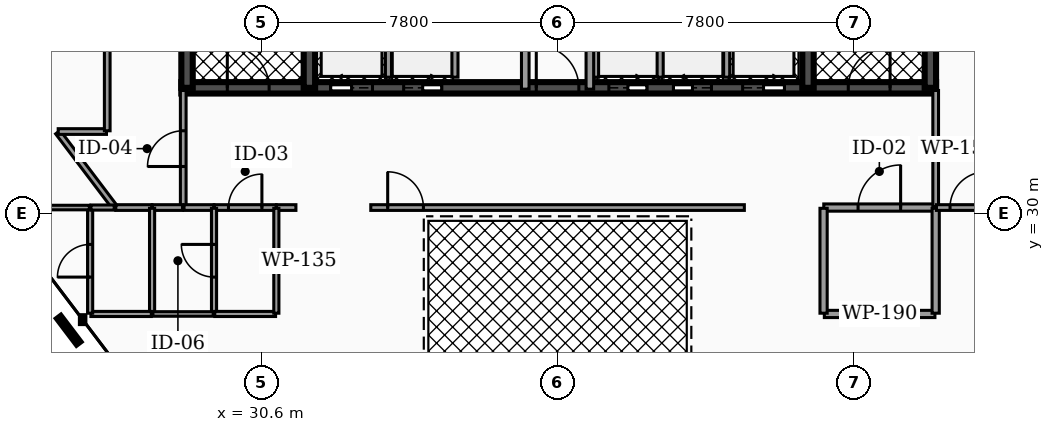
"""IFC4 building model, lengths in metres.
Left out: names, types, materials, properties, quantities, classifications, styles, units other than length and angle.
Written with IfcOpenShell. Run it as: python <this file> out.ifc"""

import sys

from ifc_helpers import new_model, si_unit, direction, frame, frame_2d, origin, place, context, subcontext, project, spatial, rectangle, extrude, element, fill, save


model = new_model("IFC4")
c1 = context("Model", 3, precision=1e-05, world=origin(), true_north=direction((0.0, 1.0)))
c2 = subcontext(c1, "Body", "Model", "MODEL_VIEW")
j1 = project(units=[si_unit("LENGTHUNIT", "METRE"), si_unit("PLANEANGLEUNIT", "RADIAN")], contexts=[c1])
p1 = place(None, origin())
s1 = spatial("IfcSite", under=j1, at=p1, CompositionType="ELEMENT")
p2 = place(p1, origin())
s2 = spatial("IfcBuilding", under=s1, at=p2, CompositionType="ELEMENT")
p3 = place(p2, frame((0.0, 0.0, 229.16)))
s3 = spatial("IfcBuildingStorey", under=s2, at=p3, CompositionType="ELEMENT", Elevation=229.16)
p4 = place(p3, frame((28.5, 33.3, 0.0), z_axis=(0.0, 0.0, 1.0), x_axis=(1.0, 0.0, 0.0)))
e1 = element("IfcWall", 1, at=p4, inside=s3, PredefinedType="SHEAR", context=c2, shape_type="SweptSolid", body=[
    extrude(rectangle(XDim=19.86, YDim=0.3, at=frame_2d((9.93, 0.0))), origin(), (0.0, 0.0, 1.0), 3.18),
])
p5 = place(p4, frame((3.93, 0.0, 0.0)))
e2 = element("IfcOpeningElement", 2, at=p5, cuts=e1, PredefinedType="OPENING", context=c2, shape_type="SweptSolid", body=[
    extrude(rectangle(XDim=1.1, YDim=2.15, at=frame_2d((0.55, 1.075))), frame((0.0, 0.16, 0.0), z_axis=(0.0, -1.0, 0.0), x_axis=(1.0, 0.0, 0.0)), (0.0, 0.0, 1.0), 0.32),
])
p6 = place(p4, frame((14.77, 0.0, 0.0)))
e3 = element("IfcOpeningElement", 3, at=p6, cuts=e1, PredefinedType="OPENING", context=c2, shape_type="SweptSolid", body=[
    extrude(rectangle(XDim=1.1, YDim=2.15, at=frame_2d((0.55, 1.075))), frame((0.0, 0.16, 0.0), z_axis=(0.0, -1.0, 0.0), x_axis=(1.0, 0.0, 0.0)), (0.0, 0.0, 1.0), 0.32),
])
p7 = place(p4, frame((11.25, 0.0, 0.0)))
e4 = element("IfcOpeningElement", 4, at=p7, cuts=e1, PredefinedType="OPENING", context=c2, shape_type="SweptSolid", body=[
    extrude(rectangle(XDim=1.0, YDim=2.1, at=frame_2d((0.5, 1.05))), frame((0.0, 0.16, 0.0), z_axis=(0.0, -1.0, 0.0), x_axis=(1.0, 0.0, 0.0)), (0.0, 0.0, 1.0), 0.32),
])
p8 = place(p4, frame((12.95, 0.0, 0.0)))
e5 = element("IfcOpeningElement", 5, at=p8, cuts=e1, PredefinedType="OPENING", context=c2, shape_type="SweptSolid", body=[
    extrude(rectangle(XDim=1.0, YDim=2.1, at=frame_2d((0.5, 1.05))), frame((0.0, 0.16, 0.0), z_axis=(0.0, -1.0, 0.0), x_axis=(1.0, 0.0, 0.0)), (0.0, 0.0, 1.0), 0.32),
])
p9 = place(p4, frame((5.85, 0.0, 0.0)))
e6 = element("IfcOpeningElement", 6, at=p9, cuts=e1, PredefinedType="OPENING", context=c2, shape_type="SweptSolid", body=[
    extrude(rectangle(XDim=1.0, YDim=2.1, at=frame_2d((0.5, 1.05))), frame((0.0, 0.16, 0.0), z_axis=(0.0, -1.0, 0.0), x_axis=(1.0, 0.0, 0.0)), (0.0, 0.0, 1.0), 0.32),
])
p10 = place(p4, frame((1.21, 0.0, 0.0)))
e7 = element("IfcOpeningElement", 7, at=p10, cuts=e1, PredefinedType="OPENING", context=c2, shape_type="SweptSolid", body=[
    extrude(rectangle(XDim=1.1, YDim=2.2, at=frame_2d((0.55, 1.1))), frame((0.0, 0.16, 0.0), z_axis=(0.0, -1.0, 0.0), x_axis=(1.0, 0.0, 0.0)), (0.0, 0.0, 1.0), 0.32),
])
p11 = place(p4, frame((9.34, 0.0, 0.0)))
e8 = element("IfcOpeningElement", 8, at=p11, cuts=e1, PredefinedType="OPENING", context=c2, shape_type="SweptSolid", body=[
    extrude(rectangle(XDim=1.12, YDim=2.05, at=frame_2d((0.56, 1.025))), frame((0.0, 0.16, 0.0), z_axis=(0.0, -1.0, 0.0), x_axis=(1.0, 0.0, 0.0)), (0.0, 0.0, 1.0), 0.32),
])
p12 = place(p4, frame((17.55, 0.0, 0.0)))
e9 = element("IfcOpeningElement", 9, at=p12, cuts=e1, PredefinedType="OPENING", context=c2, shape_type="SweptSolid", body=[
    extrude(rectangle(XDim=1.1, YDim=2.2, at=frame_2d((0.55, 1.1))), frame((0.0, 0.16, 0.0), z_axis=(0.0, -1.0, 0.0), x_axis=(1.0, 0.0, 0.0)), (0.0, 0.0, 1.0), 0.32),
])
for number, where, z_axis, x_axis in (
    (10, (28.65, 33.3, 0.0), (0.0, 0.0, 1.0), (0.0, 1.0, 0.0)),
    (11, (31.87, 33.3, 0.0), (0.0, 0.0, 1.0), (0.0, 1.0, 0.0)),
    (12, (44.99, 33.3, 0.0), (0.0, 0.0, 1.0), (0.0, 1.0, 0.0)),
    (13, (48.21, 33.3, 0.0), (0.0, 0.0, 1.0), (0.0, 1.0, 0.0)),
):
    element("IfcWall", number, at=place(p3, frame(where, z_axis=z_axis, x_axis=x_axis)), inside=s3, PredefinedType="SHEAR", context=c2, shape_type="SweptSolid", body=[
        extrude(rectangle(XDim=10.1, YDim=0.3, at=frame_2d((5.05, 0.0))), origin(), (0.0, 0.0, 1.0), 3.18),
    ])
for number, where, z_axis, x_axis in (
    (14, (33.95, 33.58, 0.0), (0.0, 0.0, 1.0), (0.0, 1.0, 0.0)),
    (15, (42.85, 33.58, 0.0), (0.0, 0.0, 1.0), (0.0, 1.0, 0.0)),
):
    element("IfcWall", number, at=place(p3, frame(where, z_axis=z_axis, x_axis=x_axis)), inside=s3, PredefinedType="SOLIDWALL", context=c2, shape_type="SweptSolid", body=[
        extrude(rectangle(XDim=2.45, YDim=0.16, at=frame_2d((1.225, 0.0))), origin(), (0.0, 0.0, 1.0), 3.18),
    ])
for number, where, z_axis, x_axis in (
    (16, (39.4, 33.58, 0.0), (0.0, 0.0, 1.0), (0.0, 1.0, 0.0)),
    (17, (41.1, 33.58, 0.0), (0.0, 0.0, 1.0), (0.0, 1.0, 0.0)),
    (18, (35.7, 33.58, 0.0), (0.0, 0.0, 1.0), (0.0, 1.0, 0.0)),
):
    element("IfcWall", number, at=place(p3, frame(where, z_axis=z_axis, x_axis=x_axis)), inside=s3, PredefinedType="SOLIDWALL", context=c2, shape_type="SweptSolid", body=[
        extrude(rectangle(XDim=2.25, YDim=0.16, at=frame_2d((1.125, 0.0))), origin(), (0.0, 0.0, 1.0), 3.18),
    ])
p13 = place(p3, frame((37.55, 33.265, 0.0), z_axis=(0.0, 0.0, 1.0), x_axis=(0.0, 1.0, 0.0)))
e19 = element("IfcWall", 19, at=p13, inside=s3, PredefinedType="PARTITIONING", context=c2, shape_type="SweptSolid", body=[
    extrude(rectangle(XDim=4.595, YDim=0.2, at=frame_2d((2.298, 0.0))), origin(), (0.0, 0.0, 1.0), 2.235),
])
p14 = place(p13, frame((1.857, 0.0, 0.0)))
e20 = element("IfcOpeningElement", 20, at=p14, cuts=e19, PredefinedType="OPENING", context=c2, shape_type="SweptSolid", body=[
    extrude(rectangle(XDim=0.88, YDim=2.05, at=frame_2d((0.44, 1.025))), frame((0.0, 0.11, 0.0), z_axis=(0.0, -1.0, 0.0), x_axis=(1.0, 0.0, 0.0)), (0.0, 0.0, 1.0), 0.22),
])
p15 = place(p3, frame((39.25, 33.265, 0.0), z_axis=(0.0, 0.0, 1.0), x_axis=(0.0, 1.0, 0.0)))
e21 = element("IfcWall", 21, at=p15, inside=s3, PredefinedType="PARTITIONING", context=c2, shape_type="SweptSolid", body=[
    extrude(rectangle(XDim=4.595, YDim=0.2, at=frame_2d((2.298, 0.0))), origin(), (0.0, 0.0, 1.0), 2.235),
])
p16 = place(p15, frame((3.058, 0.0, 0.0)))
e22 = element("IfcOpeningElement", 22, at=p16, cuts=e21, PredefinedType="OPENING", context=c2, shape_type="SweptSolid", body=[
    extrude(rectangle(XDim=0.88, YDim=2.05, at=frame_2d((0.44, 1.025))), frame((0.0, 0.11, 0.0), z_axis=(0.0, -1.0, 0.0), x_axis=(1.0, 0.0, 0.0)), (0.0, 0.0, 1.0), 0.22),
])
p17 = place(p3, frame((45.405, 30.15, 0.0), z_axis=(0.0, 0.0, 1.0), x_axis=(1.0, 0.0, 0.0)))
e23 = element("IfcWall", 23, at=p17, inside=s3, PredefinedType="PARTITIONING", context=c2, shape_type="SweptSolid", body=[
    extrude(rectangle(XDim=2.925, YDim=0.19, at=frame_2d((1.462, 0.0))), origin(), (0.0, 0.0, 1.0), 2.235),
])
p18 = place(p17, frame((0.903, 0.0, 0.0)))
e24 = element("IfcOpeningElement", 24, at=p18, cuts=e23, PredefinedType="OPENING", context=c2, shape_type="SweptSolid", body=[
    extrude(rectangle(XDim=1.12, YDim=2.05, at=frame_2d((0.56, 1.025))), frame((0.0, 0.105, 0.0), z_axis=(0.0, -1.0, 0.0), x_axis=(1.0, 0.0, 0.0)), (0.0, 0.0, 1.0), 0.21),
])
p19 = place(p3, frame((28.55, 30.17, 0.0), z_axis=(0.0, 0.0, 1.0), x_axis=(0.0, 1.0, 0.0)))
e25 = element("IfcWall", 25, at=p19, inside=s3, PredefinedType="PARTITIONING", context=c2, shape_type="SweptSolid", body=[
    extrude(rectangle(XDim=3.06, YDim=0.15, at=frame_2d((1.53, 0.0))), origin(), (0.0, 0.0, 1.0), 2.235),
])
p20 = place(p19, frame((1.06, 0.0, 0.0)))
e26 = element("IfcOpeningElement", 26, at=p20, cuts=e25, PredefinedType="OPENING", context=c2, shape_type="SweptSolid", body=[
    extrude(rectangle(XDim=0.94, YDim=2.05, at=frame_2d((0.47, 1.025))), frame((0.0, 0.085, 0.0), z_axis=(0.0, -1.0, 0.0), x_axis=(1.0, 0.0, 0.0)), (0.0, 0.0, 1.0), 0.17),
])
p21 = place(p3, frame((48.35, 30.17, 0.0), z_axis=(0.0, 0.0, 1.0), x_axis=(0.0, 1.0, 0.0)))
e27 = element("IfcWall", 27, at=p21, inside=s3, PredefinedType="PARTITIONING", context=c2, shape_type="SweptSolid", body=[
    extrude(rectangle(XDim=3.06, YDim=0.15, at=frame_2d((1.53, 0.0))), origin(), (0.0, 0.0, 1.0), 2.235),
])
p22 = place(p3, frame((29.365, 30.15, 0.0), z_axis=(0.0, 0.0, 1.0), x_axis=(1.0, 0.0, 0.0)))
e28 = element("IfcWall", 28, at=p22, inside=s3, PredefinedType="PARTITIONING", context=c2, shape_type="SweptSolid", body=[
    extrude(rectangle(XDim=1.63, YDim=0.15, at=frame_2d((0.815, 0.0))), origin(), (0.0, 0.0, 1.0), 2.235),
])
p23 = place(p22, frame((0.375, 0.0, 0.0)))
e29 = element("IfcOpeningElement", 29, at=p23, cuts=e28, PredefinedType="OPENING", context=c2, shape_type="SweptSolid", body=[
    extrude(rectangle(XDim=0.88, YDim=2.05, at=frame_2d((0.44, 1.025))), frame((0.0, 0.085, 0.0), z_axis=(0.0, -1.0, 0.0), x_axis=(1.0, 0.0, 0.0)), (0.0, 0.0, 1.0), 0.17),
])
p24 = place(p3, frame((28.57, 30.15, 0.0), z_axis=(0.0, 0.0, 1.0), x_axis=(1.0, 0.0, 0.0)))
e30 = element("IfcWall", 30, at=p24, inside=s3, PredefinedType="PARTITIONING", context=c2, shape_type="SweptSolid", body=[
    extrude(rectangle(XDim=0.785, YDim=0.15, at=frame_2d((0.393, 0.0))), origin(), (0.0, 0.0, 1.0), 2.235),
])
p25 = place(p3, frame((33.485, 30.15, 0.0), z_axis=(0.0, 0.0, 1.0), x_axis=(1.0, 0.0, 0.0)))
e31 = element("IfcWall", 31, at=p25, inside=s3, PredefinedType="PARTITIONING", context=c2, shape_type="SweptSolid", body=[
    extrude(rectangle(XDim=9.83, YDim=0.15, at=frame_2d((4.915, 0.0))), origin(), (0.0, 0.0, 1.0), 2.235),
])
p26 = place(p25, frame((0.445, 0.0, 0.0)))
e32 = element("IfcOpeningElement", 32, at=p26, cuts=e31, PredefinedType="OPENING", context=c2, shape_type="SweptSolid", body=[
    extrude(rectangle(XDim=0.94, YDim=2.05, at=frame_2d((0.47, 1.025))), frame((0.0, 0.085, 0.0), z_axis=(0.0, -1.0, 0.0), x_axis=(1.0, 0.0, 0.0)), (0.0, 0.0, 1.0), 0.17),
])
p27 = place(p3, frame((31.005, 30.15, 0.0), z_axis=(0.0, 0.0, 1.0), x_axis=(1.0, 0.0, 0.0)))
e33 = element("IfcWall", 33, at=p27, inside=s3, PredefinedType="PARTITIONING", context=c2, shape_type="SweptSolid", body=[
    extrude(rectangle(XDim=0.51, YDim=0.15, at=frame_2d((0.255, 0.0))), origin(), (0.0, 0.0, 1.0), 2.235),
])
p28 = place(p3, frame((45.42, 27.35, 0.0), z_axis=(0.0, 0.0, 1.0), x_axis=(1.0, 0.0, 0.0)))
e34 = element("IfcWall", 34, at=p28, inside=s3, PredefinedType="PARTITIONING", context=c2, shape_type="SweptSolid", body=[
    extrude(rectangle(XDim=2.91, YDim=0.19, at=frame_2d((1.455, 0.0))), origin(), (0.0, 0.0, 1.0), 2.235),
])
for number, where, z_axis, x_axis in (
    (35, (45.4, 27.37, 0.0), (0.0, 0.0, 1.0), (0.0, 1.0, 0.0)),
    (36, (48.35, 27.37, 0.0), (0.0, 0.0, 1.0), (0.0, 1.0, 0.0)),
):
    element("IfcWall", number, at=place(p3, frame(where, z_axis=z_axis, x_axis=x_axis)), inside=s3, PredefinedType="PARTITIONING", context=c2, shape_type="SweptSolid", body=[
        extrude(rectangle(XDim=2.76, YDim=0.19, at=frame_2d((1.38, 0.0))), origin(), (0.0, 0.0, 1.0), 2.235),
    ])
p29 = place(p3, frame((26.775, 30.15, 0.0), z_axis=(0.0, 0.0, 1.0), x_axis=(1.0, 0.0, 0.0)))
e37 = element("IfcWall", 37, at=p29, inside=s3, PredefinedType="PARTITIONING", context=c2, shape_type="SweptSolid", body=[
    extrude(rectangle(XDim=0.95, YDim=0.15, at=frame_2d((0.475, 0.0))), origin(), (0.0, 0.0, 1.0), 2.235),
])
p30 = place(p3, frame((27.735, 30.15, 0.0), z_axis=(0.0, 0.0, 1.0), x_axis=(1.0, 0.0, 0.0)))
e38 = element("IfcWall", 38, at=p30, inside=s3, PredefinedType="PARTITIONING", context=c2, shape_type="SweptSolid", body=[
    extrude(rectangle(XDim=0.795, YDim=0.15, at=frame_2d((0.397, 0.0))), origin(), (0.0, 0.0, 1.0), 2.235),
])
p31 = place(p3, frame((48.37, 30.15, 0.0), z_axis=(0.0, 0.0, 1.0), x_axis=(1.0, 0.0, 0.0)))
e39 = element("IfcWall", 39, at=p31, inside=s3, PredefinedType="PARTITIONING", context=c2, shape_type="SweptSolid", body=[
    extrude(rectangle(XDim=1.655, YDim=0.15, at=frame_2d((0.828, 0.0))), origin(), (0.0, 0.0, 1.0), 2.235),
])
p32 = place(p31, frame((0.358, 0.0, 0.0)))
e40 = element("IfcOpeningElement", 40, at=p32, cuts=e39, PredefinedType="OPENING", context=c2, shape_type="SweptSolid", body=[
    extrude(rectangle(XDim=0.94, YDim=2.05, at=frame_2d((0.47, 1.025))), frame((0.0, 0.085, 0.0), z_axis=(0.0, -1.0, 0.0), x_axis=(1.0, 0.0, 0.0)), (0.0, 0.0, 1.0), 0.17),
])
p33 = place(p3, frame((25.252, 32.134, 0.0), z_axis=(0.0, 0.0, 1.0), x_axis=(0.603869110647, -0.797083494502, 0.0)))
e41 = element("IfcWall", 41, at=p33, inside=s3, PredefinedType="PARTITIONING", context=c2, shape_type="SweptSolid", body=[
    extrude(rectangle(XDim=2.469, YDim=0.15, at=frame_2d((1.234, 0.0))), origin(), (0.0, 0.0, 1.0), 2.235),
])
p34 = place(p3, frame((25.26, 32.15, 0.0), z_axis=(0.0, 0.0, 1.0), x_axis=(1.0, 0.0, 0.0)))
e42 = element("IfcWall", 42, at=p34, inside=s3, PredefinedType="PARTITIONING", context=c2, shape_type="SweptSolid", body=[
    extrude(rectangle(XDim=1.271, YDim=0.15, at=frame_2d((0.635, 0.0))), origin(), (0.0, 0.0, 1.0), 2.235),
])
p35 = place(p3, frame((26.55, 32.17, 0.0), z_axis=(0.0, 0.0, 1.0), x_axis=(0.0, 1.0, 0.0)))
e43 = element("IfcWall", 43, at=p35, inside=s3, PredefinedType="PARTITIONING", context=c2, shape_type="SweptSolid", body=[
    extrude(rectangle(XDim=11.38, YDim=0.15, at=frame_2d((5.69, 0.0))), origin(), (0.0, 0.0, 1.0), 2.235),
])
p36 = place(p35, frame((5.22, 0.0, 0.0)))
e44 = element("IfcOpeningElement", 44, at=p36, cuts=e43, PredefinedType="OPENING", context=c2, shape_type="SweptSolid", body=[
    extrude(rectangle(XDim=0.94, YDim=2.05, at=frame_2d((0.47, 1.025))), frame((0.0, 0.085, 0.0), z_axis=(0.0, -1.0, 0.0), x_axis=(1.0, 0.0, 0.0)), (0.0, 0.0, 1.0), 0.17),
])
p37 = place(p3, frame((29.36, 27.37, 0.0), z_axis=(0.0, 0.0, 1.0), x_axis=(0.0, 1.0, 0.0)))
e45 = element("IfcWall", 45, at=p37, inside=s3, PredefinedType="PARTITIONING", context=c2, shape_type="SweptSolid", body=[
    extrude(rectangle(XDim=2.76, YDim=0.135, at=frame_2d((1.38, 0.0))), origin(), (0.0, 0.0, 1.0), 2.235),
])
p38 = place(p37, frame((0.95, 0.0, 0.0)))
e46 = element("IfcOpeningElement", 46, at=p38, cuts=e45, PredefinedType="OPENING", context=c2, shape_type="SweptSolid", body=[
    extrude(rectangle(XDim=0.86, YDim=2.05, at=frame_2d((0.43, 1.025))), frame((0.0, 0.077, 0.0), z_axis=(0.0, -1.0, 0.0), x_axis=(1.0, 0.0, 0.0)), (0.0, 0.0, 1.0), 0.155),
])
p39 = place(p3, frame((29.38, 27.35, 0.0), z_axis=(0.0, 0.0, 1.0), x_axis=(1.0, 0.0, 0.0)))
e47 = element("IfcWall", 47, at=p39, inside=s3, PredefinedType="PARTITIONING", context=c2, shape_type="SweptSolid", body=[
    extrude(rectangle(XDim=1.6, YDim=0.135, at=frame_2d((0.8, 0.0))), origin(), (0.0, 0.0, 1.0), 2.235),
])
for number, where, z_axis, x_axis in (
    (48, (31.0, 27.37, 0.0), (0.0, 0.0, 1.0), (0.0, 1.0, 0.0)),
    (49, (27.73, 27.37, 0.0), (0.0, 0.0, 1.0), (0.0, 1.0, 0.0)),
):
    element("IfcWall", number, at=place(p3, frame(where, z_axis=z_axis, x_axis=x_axis)), inside=s3, PredefinedType="PARTITIONING", context=c2, shape_type="SweptSolid", body=[
        extrude(rectangle(XDim=2.76, YDim=0.135, at=frame_2d((1.38, 0.0))), origin(), (0.0, 0.0, 1.0), 2.235),
    ])
p40 = place(p3, frame((26.12, 27.35, 0.0), z_axis=(0.0, 0.0, 1.0), x_axis=(1.0, 0.0, 0.0)))
e50 = element("IfcWall", 50, at=p40, inside=s3, PredefinedType="PARTITIONING", context=c2, shape_type="SweptSolid", body=[
    extrude(rectangle(XDim=1.59, YDim=0.135, at=frame_2d((0.795, 0.0))), origin(), (0.0, 0.0, 1.0), 2.235),
])
p41 = place(p3, frame((26.1, 27.37, 0.0), z_axis=(0.0, 0.0, 1.0), x_axis=(0.0, 1.0, 0.0)))
e51 = element("IfcWall", 51, at=p41, inside=s3, PredefinedType="PARTITIONING", context=c2, shape_type="SweptSolid", body=[
    extrude(rectangle(XDim=2.76, YDim=0.135, at=frame_2d((1.38, 0.0))), origin(), (0.0, 0.0, 1.0), 2.235),
])
p42 = place(p41, frame((0.95, 0.0, 0.0)))
e52 = element("IfcOpeningElement", 52, at=p42, cuts=e51, PredefinedType="OPENING", context=c2, shape_type="SweptSolid", body=[
    extrude(rectangle(XDim=0.86, YDim=2.05, at=frame_2d((0.43, 1.025))), frame((0.0, 0.077, 0.0), z_axis=(0.0, -1.0, 0.0), x_axis=(1.0, 0.0, 0.0)), (0.0, 0.0, 1.0), 0.155),
])
p43 = place(p3, frame((26.12, 30.15, 0.0), z_axis=(0.0, 0.0, 1.0), x_axis=(1.0, 0.0, 0.0)))
e53 = element("IfcWall", 53, at=p43, inside=s3, PredefinedType="PARTITIONING", context=c2, shape_type="SweptSolid", body=[
    extrude(rectangle(XDim=0.615, YDim=0.135, at=frame_2d((0.307, 0.0))), origin(), (0.0, 0.0, 1.0), 2.235),
])
p44 = place(p3, frame((27.75, 27.35, 0.0), z_axis=(0.0, 0.0, 1.0), x_axis=(1.0, 0.0, 0.0)))
e54 = element("IfcWall", 54, at=p44, inside=s3, PredefinedType="PARTITIONING", context=c2, shape_type="SweptSolid", body=[
    extrude(rectangle(XDim=1.59, YDim=0.12, at=frame_2d((0.795, 0.0))), origin(), (0.0, 0.0, 1.0), 2.235),
])
p45 = place(p3, frame((24.754, 30.15, 0.0), z_axis=(0.0, 0.0, 1.0), x_axis=(1.0, 0.0, 0.0)))
e55 = element("IfcWall", 55, at=p45, inside=s3, PredefinedType="PARTITIONING", context=c2, shape_type="SweptSolid", body=[
    extrude(rectangle(XDim=1.326, YDim=0.12, at=frame_2d((0.663, 0.0))), origin(), (0.0, 0.0, 1.0), 2.235),
])
p46 = place(p5, origin())
e56 = element("IfcDoor", 56, at=p46, inside=s3, OperationType="SLIDING_TO_LEFT", PredefinedType="DOOR", context=c2, shape_type="SweptSolid", body=[
    extrude(rectangle(XDim=1.1, YDim=2.15, at=frame_2d((0.55, 1.075))), frame((0.0, 0.025, 0.0), z_axis=(0.0, -1.0, 0.0), x_axis=(1.0, 0.0, 0.0)), (0.0, 0.0, 1.0), 0.05),
])
fill(e2, e56)
p47 = place(p6, origin())
e57 = element("IfcDoor", 57, at=p47, inside=s3, OperationType="SLIDING_TO_RIGHT", PredefinedType="DOOR", context=c2, shape_type="SweptSolid", body=[
    extrude(rectangle(XDim=1.1, YDim=2.15, at=frame_2d((0.55, 1.075))), frame((0.0, 0.025, 0.0), z_axis=(0.0, -1.0, 0.0), x_axis=(1.0, 0.0, 0.0)), (0.0, 0.0, 1.0), 0.05),
])
fill(e3, e57)
p48 = place(p7, origin())
e58 = element("IfcDoor", 58, at=p48, inside=s3, OperationType="SLIDING_TO_RIGHT", PredefinedType="DOOR", context=c2, shape_type="SweptSolid", body=[
    extrude(rectangle(XDim=1.0, YDim=2.1, at=frame_2d((0.5, 1.05))), frame((0.0, 0.025, 0.0), z_axis=(0.0, -1.0, 0.0), x_axis=(1.0, 0.0, 0.0)), (0.0, 0.0, 1.0), 0.05),
])
fill(e4, e58)
p49 = place(p8, origin())
e59 = element("IfcDoor", 59, at=p49, inside=s3, OperationType="SLIDING_TO_LEFT", PredefinedType="DOOR", context=c2, shape_type="SweptSolid", body=[
    extrude(rectangle(XDim=1.0, YDim=2.1, at=frame_2d((0.5, 1.05))), frame((0.0, 0.025, 0.0), z_axis=(0.0, -1.0, 0.0), x_axis=(1.0, 0.0, 0.0)), (0.0, 0.0, 1.0), 0.05),
])
fill(e5, e59)
p50 = place(p9, origin())
e60 = element("IfcDoor", 60, at=p50, inside=s3, OperationType="SLIDING_TO_RIGHT", PredefinedType="DOOR", context=c2, shape_type="SweptSolid", body=[
    extrude(rectangle(XDim=1.0, YDim=2.1, at=frame_2d((0.5, 1.05))), frame((0.0, 0.025, 0.0), z_axis=(0.0, -1.0, 0.0), x_axis=(1.0, 0.0, 0.0)), (0.0, 0.0, 1.0), 0.05),
])
fill(e6, e60)
p51 = place(p10, origin())
e61 = element("IfcDoor", 61, at=p51, inside=s3, OperationType="SINGLE_SWING_LEFT", PredefinedType="DOOR", context=c2, shape_type="SweptSolid", body=[
    extrude(rectangle(XDim=1.1, YDim=2.2, at=frame_2d((0.55, 1.1))), frame((0.0, 0.025, 0.0), z_axis=(0.0, -1.0, 0.0), x_axis=(1.0, 0.0, 0.0)), (0.0, 0.0, 1.0), 0.05),
])
fill(e7, e61)
p52 = place(p11, origin())
e62 = element("IfcDoor", 62, at=p52, inside=s3, OperationType="SINGLE_SWING_LEFT", PredefinedType="DOOR", context=c2, shape_type="SweptSolid", body=[
    extrude(rectangle(XDim=1.12, YDim=2.05, at=frame_2d((0.56, 1.025))), frame((0.0, 0.025, 0.0), z_axis=(0.0, -1.0, 0.0), x_axis=(1.0, 0.0, 0.0)), (0.0, 0.0, 1.0), 0.05),
])
fill(e8, e62)
p53 = place(p12, origin())
e63 = element("IfcDoor", 63, at=p53, inside=s3, OperationType="SINGLE_SWING_RIGHT", PredefinedType="DOOR", context=c2, shape_type="SweptSolid", body=[
    extrude(rectangle(XDim=1.1, YDim=2.2, at=frame_2d((0.55, 1.1))), frame((0.0, 0.025, 0.0), z_axis=(0.0, -1.0, 0.0), x_axis=(1.0, 0.0, 0.0)), (0.0, 0.0, 1.0), 0.05),
])
fill(e9, e63)
p54 = place(p18, origin())
e64 = element("IfcDoor", 64, at=p54, inside=s3, OperationType="SINGLE_SWING_RIGHT", PredefinedType="DOOR", context=c2, shape_type="SweptSolid", body=[
    extrude(rectangle(XDim=1.12, YDim=2.05, at=frame_2d((0.56, 1.025))), frame((0.0, 0.025, 0.0), z_axis=(0.0, -1.0, 0.0), x_axis=(1.0, 0.0, 0.0)), (0.0, 0.0, 1.0), 0.05),
])
fill(e24, e64)
p55 = place(p20, origin())
e65 = element("IfcDoor", 65, at=p55, inside=s3, OperationType="SINGLE_SWING_LEFT", PredefinedType="DOOR", context=c2, shape_type="SweptSolid", body=[
    extrude(rectangle(XDim=0.94, YDim=2.05, at=frame_2d((0.47, 1.025))), frame((0.0, 0.025, 0.0), z_axis=(0.0, -1.0, 0.0), x_axis=(1.0, 0.0, 0.0)), (0.0, 0.0, 1.0), 0.05),
])
fill(e26, e65)
p56 = place(p23, origin())
e66 = element("IfcDoor", 66, at=p56, inside=s3, OperationType="SINGLE_SWING_RIGHT", PredefinedType="DOOR", context=c2, shape_type="SweptSolid", body=[
    extrude(rectangle(XDim=0.88, YDim=2.05, at=frame_2d((0.44, 1.025))), frame((0.0, 0.025, 0.0), z_axis=(0.0, -1.0, 0.0), x_axis=(1.0, 0.0, 0.0)), (0.0, 0.0, 1.0), 0.05),
])
fill(e29, e66)
p57 = place(p26, origin())
e67 = element("IfcDoor", 67, at=p57, inside=s3, OperationType="SINGLE_SWING_LEFT", PredefinedType="DOOR", context=c2, shape_type="SweptSolid", body=[
    extrude(rectangle(XDim=0.94, YDim=2.05, at=frame_2d((0.47, 1.025))), frame((0.0, 0.025, 0.0), z_axis=(0.0, -1.0, 0.0), x_axis=(1.0, 0.0, 0.0)), (0.0, 0.0, 1.0), 0.05),
])
fill(e32, e67)
p58 = place(p32, origin())
e68 = element("IfcDoor", 68, at=p58, inside=s3, OperationType="SINGLE_SWING_RIGHT", PredefinedType="DOOR", context=c2, shape_type="SweptSolid", body=[
    extrude(rectangle(XDim=0.94, YDim=2.05, at=frame_2d((0.47, 1.025))), frame((0.0, 0.025, 0.0), z_axis=(0.0, -1.0, 0.0), x_axis=(1.0, 0.0, 0.0)), (0.0, 0.0, 1.0), 0.05),
])
fill(e40, e68)
p59 = place(p38, origin())
e69 = element("IfcDoor", 69, at=p59, inside=s3, OperationType="SINGLE_SWING_RIGHT", PredefinedType="DOOR", context=c2, shape_type="SweptSolid", body=[
    extrude(rectangle(XDim=0.86, YDim=2.05, at=frame_2d((0.43, 1.025))), frame((0.0, 0.025, 0.0), z_axis=(0.0, -1.0, 0.0), x_axis=(1.0, 0.0, 0.0)), (0.0, 0.0, 1.0), 0.05),
])
fill(e46, e69)
p60 = place(p42, origin())
e70 = element("IfcDoor", 70, at=p60, inside=s3, OperationType="SINGLE_SWING_LEFT", PredefinedType="DOOR", context=c2, shape_type="SweptSolid", body=[
    extrude(rectangle(XDim=0.86, YDim=2.05, at=frame_2d((0.43, 1.025))), frame((0.0, 0.025, 0.0), z_axis=(0.0, -1.0, 0.0), x_axis=(1.0, 0.0, 0.0)), (0.0, 0.0, 1.0), 0.05),
])
fill(e52, e70)
save(model, sys.argv[1])
